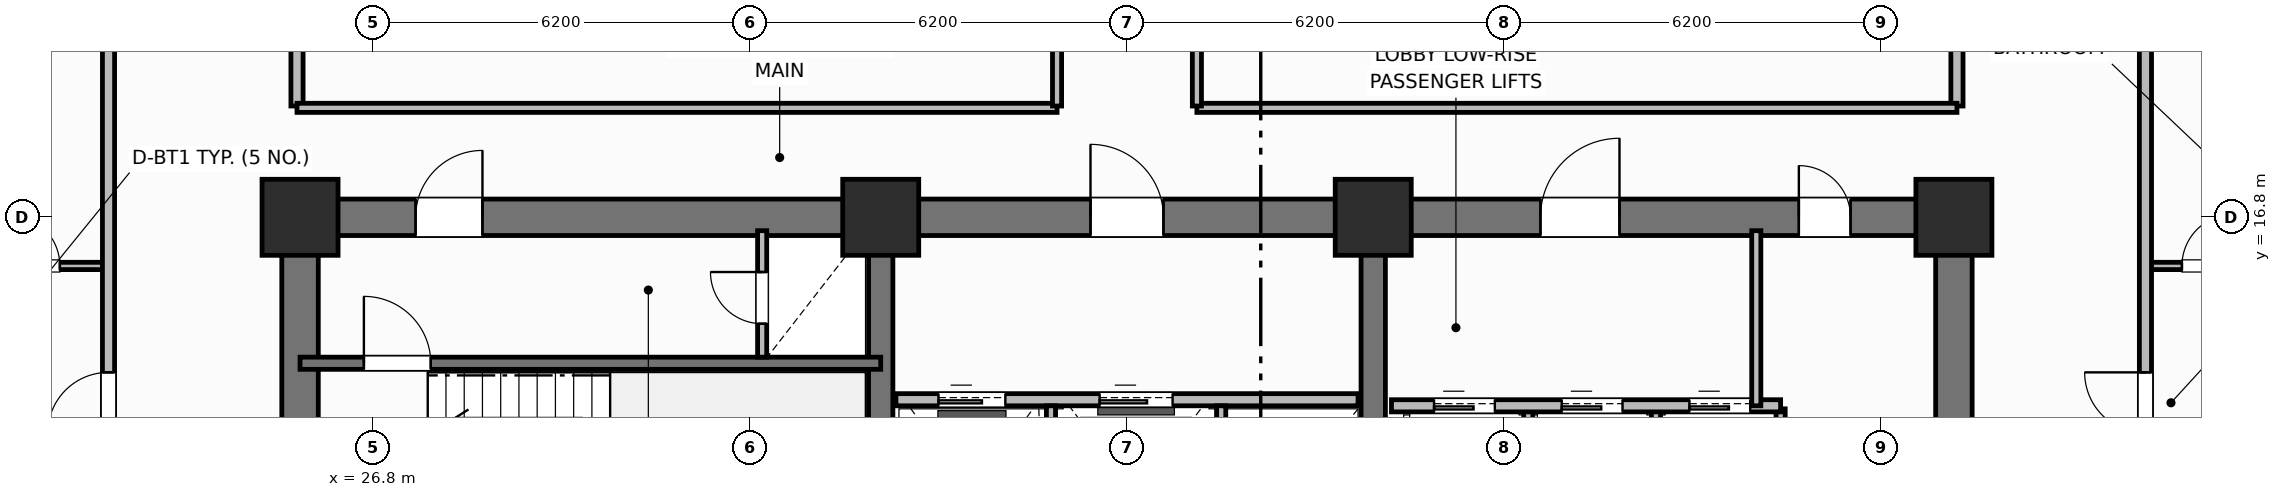
"""IFC4 building model, lengths in metres.
Left out: names, types, materials, properties, quantities, classifications, styles, units other than length and angle.
Written with IfcOpenShell. Run it as: python <this file> out.ifc"""

import sys

from ifc_helpers import new_model, si_unit, direction, frame, frame_2d, origin, origin_2d, place, context, subcontext, project, spatial, rectangle, extrude, element, fill, save


model = new_model("IFC4")
c1 = context("Model", 3, precision=1e-05, world=origin(), true_north=direction((0.0, 1.0)))
c2 = subcontext(c1, "Body", "Model", "MODEL_VIEW")
j1 = project(units=[si_unit("LENGTHUNIT", "METRE"), si_unit("PLANEANGLEUNIT", "RADIAN")], contexts=[c1])
p1 = place(None, origin())
s1 = spatial("IfcSite", under=j1, at=p1, CompositionType="ELEMENT")
p2 = place(p1, origin())
s2 = spatial("IfcBuilding", under=s1, at=p2, CompositionType="ELEMENT")
p3 = place(p2, frame((0.0, 0.0, 32.5)))
s3 = spatial("IfcBuildingStorey", under=s2, at=p3, CompositionType="ELEMENT", Elevation=32.5)
for number, where, z_axis, x_axis in (
    (1, (25.6, 10.9, 0.0), (0.0, 0.0, 1.0), (0.0, 1.0, 0.0)),
    (2, (52.8, 10.9, 0.0), (0.0, 0.0, 1.0), (0.0, 1.0, 0.0)),
):
    element("IfcWall", number, at=place(p3, frame(where, z_axis=z_axis, x_axis=x_axis)), inside=s3, PredefinedType="SHEAR", context=c2, shape_type="SweptSolid", body=[
        extrude(rectangle(XDim=5.6, YDim=0.6, at=frame_2d((2.8, 0.0))), origin(), (0.0, 0.0, 1.0), 3.7),
    ])
p4 = place(p3, frame((25.6, 16.8, 0.0), z_axis=(0.0, 0.0, 1.0), x_axis=(1.0, 0.0, 0.0)))
e3 = element("IfcWall", 3, at=p4, inside=s3, PredefinedType="SHEAR", context=c2, shape_type="SweptSolid", body=[
    extrude(rectangle(XDim=27.2, YDim=0.6, at=frame_2d((13.6, 0.0))), origin(), (0.0, 0.0, 1.0), 3.7),
])
p5 = place(p4, frame((1.9, 0.0, 0.0)))
e4 = element("IfcOpeningElement", 4, at=p5, cuts=e3, PredefinedType="OPENING", context=c2, shape_type="SweptSolid", body=[
    extrude(rectangle(XDim=1.1, YDim=2.15, at=frame_2d((0.55, 1.075))), frame((0.0, 0.31, 0.0), z_axis=(0.0, -1.0, 0.0), x_axis=(1.0, 0.0, 0.0)), (0.0, 0.0, 1.0), 0.62),
])
p6 = place(p4, frame((13.0, 0.0, 0.0)))
e5 = element("IfcOpeningElement", 5, at=p6, cuts=e3, PredefinedType="OPENING", context=c2, shape_type="SweptSolid", body=[
    extrude(rectangle(XDim=1.2, YDim=2.15, at=frame_2d((0.6, 1.075))), frame((0.0, 0.31, 0.0), z_axis=(0.0, -1.0, 0.0), x_axis=(1.0, 0.0, 0.0)), (0.0, 0.0, 1.0), 0.62),
])
p7 = place(p4, frame((20.4, 0.0, 0.0)))
e6 = element("IfcOpeningElement", 6, at=p7, cuts=e3, PredefinedType="OPENING", context=c2, shape_type="SweptSolid", body=[
    extrude(rectangle(XDim=1.3, YDim=2.2, at=frame_2d((0.65, 1.1))), frame((0.0, 0.31, 0.0), z_axis=(0.0, -1.0, 0.0), x_axis=(1.0, 0.0, 0.0)), (0.0, 0.0, 1.0), 0.62),
])
p8 = place(p4, frame((24.65, 0.0, 0.0)))
e7 = element("IfcOpeningElement", 7, at=p8, cuts=e3, PredefinedType="OPENING", context=c2, shape_type="SweptSolid", body=[
    extrude(rectangle(XDim=0.85, YDim=2.1, at=frame_2d((0.425, 1.05))), frame((0.0, 0.31, 0.0), z_axis=(0.0, -1.0, 0.0), x_axis=(1.0, 0.0, 0.0)), (0.0, 0.0, 1.0), 0.62),
])
for number, where, z_axis, x_axis in (
    (8, (35.15, 10.9, 0.0), (0.0, 0.0, 1.0), (0.0, 1.0, 0.0)),
    (9, (43.25, 10.9, 0.0), (0.0, 0.0, 1.0), (0.0, 1.0, 0.0)),
):
    element("IfcWall", number, at=place(p3, frame(where, z_axis=z_axis, x_axis=x_axis)), inside=s3, PredefinedType="SHEAR", context=c2, shape_type="SweptSolid", body=[
        extrude(rectangle(XDim=5.6, YDim=0.4, at=frame_2d((2.8, 0.0))), origin(), (0.0, 0.0, 1.0), 3.7),
    ])
for number, where, z_axis, x_axis in (
    (10, (25.6, 16.8, 0.0), (0.0, 0.0, 1.0), (1.0, 0.0, 0.0)),
    (11, (35.15, 16.8, 0.0), (0.0, 0.0, 1.0), (1.0, 0.0, 0.0)),
    (12, (43.25, 16.8, 0.0), (0.0, 0.0, 1.0), (1.0, 0.0, 0.0)),
    (13, (52.8, 16.8, 0.0), (0.0, 0.0, 1.0), (1.0, 0.0, 0.0)),
):
    element("IfcColumn", number, at=place(p3, frame(where, z_axis=z_axis, x_axis=x_axis)), inside=s3, PredefinedType="COLUMN", context=c2, shape_type="SweptSolid", body=[
        extrude(rectangle(XDim=1.25, YDim=1.25, at=origin_2d()), origin(), (0.0, 0.0, 1.0), 3.7),
    ])
p9 = place(p3, frame((25.6, 14.4, 0.0), z_axis=(0.0, 0.0, 1.0), x_axis=(1.0, 0.0, 0.0)))
e14 = element("IfcWall", 14, at=p9, inside=s3, PredefinedType="SHEAR", context=c2, shape_type="SweptSolid", body=[
    extrude(rectangle(XDim=9.55, YDim=0.2, at=frame_2d((4.775, 0.0))), origin(), (0.0, 0.0, 1.0), 3.7),
])
p10 = place(p9, frame((1.05, 0.0, 0.0)))
e15 = element("IfcOpeningElement", 15, at=p10, cuts=e14, PredefinedType="OPENING", context=c2, shape_type="SweptSolid", body=[
    extrude(rectangle(XDim=1.1, YDim=2.15, at=frame_2d((0.55, 1.075))), frame((0.0, 0.11, 0.0), z_axis=(0.0, -1.0, 0.0), x_axis=(1.0, 0.0, 0.0)), (0.0, 0.0, 1.0), 0.22),
])
p11 = place(p3, frame((33.2, 14.5, 0.0), z_axis=(0.0, 0.0, 1.0), x_axis=(0.0, 1.0, 0.0)))
e16 = element("IfcWall", 16, at=p11, inside=s3, PredefinedType="PARTITIONING", context=c2, shape_type="SweptSolid", body=[
    extrude(rectangle(XDim=2.08, YDim=0.15, at=frame_2d((1.04, 0.0))), origin(), (0.0, 0.0, 1.0), 2.53),
])
p12 = place(p11, frame((0.55, 0.0, 0.0)))
e17 = element("IfcOpeningElement", 17, at=p12, cuts=e16, PredefinedType="OPENING", context=c2, shape_type="SweptSolid", body=[
    extrude(rectangle(XDim=0.85, YDim=2.05, at=frame_2d((0.425, 1.025))), frame((0.0, 0.085, 0.0), z_axis=(0.0, -1.0, 0.0), x_axis=(1.0, 0.0, 0.0)), (0.0, 0.0, 1.0), 0.17),
])
p13 = place(p3, frame((35.4, 13.8, 0.0), z_axis=(0.0, 0.0, 1.0), x_axis=(1.0, 0.0, 0.0)))
e18 = element("IfcWall", 18, at=p13, inside=s3, PredefinedType="PARTITIONING", context=c2, shape_type="SweptSolid", body=[
    extrude(rectangle(XDim=7.6, YDim=0.2, at=frame_2d((3.8, 0.0))), origin(), (0.0, 0.0, 1.0), 2.3),
])
p14 = place(p13, frame((0.7, 0.0, 0.0)))
e19 = element("IfcOpeningElement", 19, at=p14, cuts=e18, PredefinedType="OPENING", context=c2, shape_type="SweptSolid", body=[
    extrude(rectangle(XDim=1.1, YDim=2.15, at=frame_2d((0.55, 1.075))), frame((0.0, 0.11, 0.0), z_axis=(0.0, -1.0, 0.0), x_axis=(1.0, 0.0, 0.0)), (0.0, 0.0, 1.0), 0.22),
])
p15 = place(p13, frame((3.35, 0.0, 0.0)))
e20 = element("IfcOpeningElement", 20, at=p15, cuts=e18, PredefinedType="OPENING", context=c2, shape_type="SweptSolid", body=[
    extrude(rectangle(XDim=1.2, YDim=2.15, at=frame_2d((0.6, 1.075))), frame((0.0, 0.11, 0.0), z_axis=(0.0, -1.0, 0.0), x_axis=(1.0, 0.0, 0.0)), (0.0, 0.0, 1.0), 0.22),
])
for number, where, z_axis, x_axis in (
    (21, (37.95, 10.95, 0.0), (0.0, 0.0, 1.0), (0.0, 1.0, 0.0)),
    (22, (40.75, 10.95, 0.0), (0.0, 0.0, 1.0), (0.0, 1.0, 0.0)),
):
    element("IfcWall", number, at=place(p3, frame(where, z_axis=z_axis, x_axis=x_axis)), inside=s3, PredefinedType="PARTITIONING", context=c2, shape_type="SweptSolid", body=[
        extrude(rectangle(XDim=2.75, YDim=0.15, at=frame_2d((1.375, 0.0))), origin(), (0.0, 0.0, 1.0), 2.53),
    ])
for number, where, z_axis, x_axis in (
    (23, (45.8, 10.95, 0.0), (0.0, 0.0, 1.0), (0.0, 1.0, 0.0)),
    (24, (47.9, 10.95, 0.0), (0.0, 0.0, 1.0), (0.0, 1.0, 0.0)),
    (25, (49.95, 10.95, 0.0), (0.0, 0.0, 1.0), (0.0, 1.0, 0.0)),
):
    element("IfcWall", number, at=place(p3, frame(where, z_axis=z_axis, x_axis=x_axis)), inside=s3, PredefinedType="PARTITIONING", context=c2, shape_type="SweptSolid", body=[
        extrude(rectangle(XDim=2.7, YDim=0.15, at=frame_2d((1.35, 0.0))), origin(), (0.0, 0.0, 1.0), 2.53),
    ])
p16 = place(p3, frame((43.55, 13.7, 0.0), z_axis=(0.0, 0.0, 1.0), x_axis=(1.0, 0.0, 0.0)))
e26 = element("IfcWall", 26, at=p16, inside=s3, PredefinedType="PARTITIONING", context=c2, shape_type="SweptSolid", body=[
    extrude(rectangle(XDim=6.4, YDim=0.2, at=frame_2d((3.2, 0.0))), origin(), (0.0, 0.0, 1.0), 2.53),
])
p17 = place(p16, frame((0.7, 0.0, 0.0)))
e27 = element("IfcOpeningElement", 27, at=p17, cuts=e26, PredefinedType="OPENING", context=c2, shape_type="SweptSolid", body=[
    extrude(rectangle(XDim=1.0, YDim=2.15, at=frame_2d((0.5, 1.075))), frame((0.0, 0.11, 0.0), z_axis=(0.0, -1.0, 0.0), x_axis=(1.0, 0.0, 0.0)), (0.0, 0.0, 1.0), 0.22),
])
p18 = place(p16, frame((2.8, 0.0, 0.0)))
e28 = element("IfcOpeningElement", 28, at=p18, cuts=e26, PredefinedType="OPENING", context=c2, shape_type="SweptSolid", body=[
    extrude(rectangle(XDim=1.0, YDim=2.15, at=frame_2d((0.5, 1.075))), frame((0.0, 0.11, 0.0), z_axis=(0.0, -1.0, 0.0), x_axis=(1.0, 0.0, 0.0)), (0.0, 0.0, 1.0), 0.22),
])
p19 = place(p16, frame((4.9, 0.0, 0.0)))
e29 = element("IfcOpeningElement", 29, at=p19, cuts=e26, PredefinedType="OPENING", context=c2, shape_type="SweptSolid", body=[
    extrude(rectangle(XDim=1.0, YDim=2.15, at=frame_2d((0.5, 1.075))), frame((0.0, 0.11, 0.0), z_axis=(0.0, -1.0, 0.0), x_axis=(1.0, 0.0, 0.0)), (0.0, 0.0, 1.0), 0.22),
])
p20 = place(p3, frame((49.55, 13.7, 0.0), z_axis=(0.0, 0.0, 1.0), x_axis=(0.0, 1.0, 0.0)))
e30 = element("IfcWall", 30, at=p20, inside=s3, PredefinedType="PARTITIONING", context=c2, shape_type="SweptSolid", body=[
    extrude(rectangle(XDim=2.88, YDim=0.15, at=frame_2d((1.44, 0.0))), origin(), (0.0, 0.0, 1.0), 2.53),
])
for number, where, z_axis, x_axis in (
    (31, (25.55, 18.63, 0.0), (0.0, 0.0, 1.0), (0.0, 1.0, 0.0)),
    (32, (52.85, 18.63, 0.0), (0.0, 0.0, 1.0), (0.0, 1.0, 0.0)),
):
    element("IfcWall", number, at=place(p3, frame(where, z_axis=z_axis, x_axis=x_axis)), inside=s3, PredefinedType="PARTITIONING", context=c2, shape_type="SweptSolid", body=[
        extrude(rectangle(XDim=19.14, YDim=0.2, at=frame_2d((9.57, 0.0))), origin(), (0.0, 0.0, 1.0), 2.53),
    ])
for number, where, z_axis, x_axis in (
    (33, (25.55, 18.6, 0.0), (0.0, 0.0, 1.0), (1.0, 0.0, 0.0)),
    (34, (40.35, 18.6, 0.0), (0.0, 0.0, 1.0), (1.0, 0.0, 0.0)),
):
    element("IfcWall", number, at=place(p3, frame(where, z_axis=z_axis, x_axis=x_axis)), inside=s3, PredefinedType="PARTITIONING", context=c2, shape_type="SweptSolid", body=[
        extrude(rectangle(XDim=12.5, YDim=0.15, at=frame_2d((6.25, 0.0))), origin(), (0.0, 0.0, 1.0), 2.53),
    ])
p21 = place(p3, frame((38.05, 18.63, 0.0), z_axis=(0.0, 0.0, 1.0), x_axis=(0.0, 1.0, 0.0)))
e35 = element("IfcWall", 35, at=p21, inside=s3, PredefinedType="PARTITIONING", context=c2, shape_type="SweptSolid", body=[
    extrude(rectangle(XDim=19.14, YDim=0.15, at=frame_2d((9.57, 0.0))), origin(), (0.0, 0.0, 1.0), 2.53),
])
p22 = place(p21, frame((5.5, 0.0, 0.0)))
e36 = element("IfcOpeningElement", 36, at=p22, cuts=e35, PredefinedType="OPENING", context=c2, shape_type="SweptSolid", body=[
    extrude(rectangle(XDim=1.0, YDim=2.15, at=frame_2d((0.5, 1.075))), frame((0.0, 0.085, 0.0), z_axis=(0.0, -1.0, 0.0), x_axis=(1.0, 0.0, 0.0)), (0.0, 0.0, 1.0), 0.17),
])
p23 = place(p3, frame((40.35, 18.63, 0.0), z_axis=(0.0, 0.0, 1.0), x_axis=(0.0, 1.0, 0.0)))
e37 = element("IfcWall", 37, at=p23, inside=s3, PredefinedType="PARTITIONING", context=c2, shape_type="SweptSolid", body=[
    extrude(rectangle(XDim=19.14, YDim=0.15, at=frame_2d((9.57, 0.0))), origin(), (0.0, 0.0, 1.0), 2.53),
])
p24 = place(p23, frame((5.5, 0.0, 0.0)))
e38 = element("IfcOpeningElement", 38, at=p24, cuts=e37, PredefinedType="OPENING", context=c2, shape_type="SweptSolid", body=[
    extrude(rectangle(XDim=1.0, YDim=2.15, at=frame_2d((0.5, 1.075))), frame((0.0, 0.085, 0.0), z_axis=(0.0, -1.0, 0.0), x_axis=(1.0, 0.0, 0.0)), (0.0, 0.0, 1.0), 0.17),
])
p25 = place(p3, frame((20.2, 16.0, 0.0), z_axis=(0.0, 0.0, 1.0), x_axis=(1.0, 0.0, 0.0)))
e39 = element("IfcWall", 39, at=p25, inside=s3, PredefinedType="PARTITIONING", context=c2, shape_type="SweptSolid", body=[
    extrude(rectangle(XDim=2.25, YDim=0.12, at=frame_2d((1.125, 0.0))), origin(), (0.0, 0.0, 1.0), 2.53),
])
p26 = place(p25, frame((0.6, 0.0, 0.0)))
e40 = element("IfcOpeningElement", 40, at=p26, cuts=e39, PredefinedType="OPENING", context=c2, shape_type="SweptSolid", body=[
    extrude(rectangle(XDim=0.85, YDim=2.1, at=frame_2d((0.425, 1.05))), frame((0.0, 0.07, 0.0), z_axis=(0.0, -1.0, 0.0), x_axis=(1.0, 0.0, 0.0)), (0.0, 0.0, 1.0), 0.14),
])
p27 = place(p3, frame((22.45, 10.6, 0.0), z_axis=(0.0, 0.0, 1.0), x_axis=(0.0, 1.0, 0.0)))
e41 = element("IfcWall", 41, at=p27, inside=s3, PredefinedType="PARTITIONING", context=c2, shape_type="SweptSolid", body=[
    extrude(rectangle(XDim=35.2, YDim=0.2, at=frame_2d((17.6, 0.0))), origin(), (0.0, 0.0, 1.0), 2.53),
])
p28 = place(p27, frame((2.65, 0.0, 0.0)))
e42 = element("IfcOpeningElement", 42, at=p28, cuts=e41, PredefinedType="OPENING", context=c2, shape_type="SweptSolid", body=[
    extrude(rectangle(XDim=1.0, YDim=2.15, at=frame_2d((0.5, 1.075))), frame((0.0, 0.11, 0.0), z_axis=(0.0, -1.0, 0.0), x_axis=(1.0, 0.0, 0.0)), (0.0, 0.0, 1.0), 0.22),
])
p29 = place(p27, frame((19.95, 0.0, 0.0)))
e43 = element("IfcOpeningElement", 43, at=p29, cuts=e41, PredefinedType="OPENING", context=c2, shape_type="SweptSolid", body=[
    extrude(rectangle(XDim=1.0, YDim=2.15, at=frame_2d((0.5, 1.075))), frame((0.0, 0.11, 0.0), z_axis=(0.0, -1.0, 0.0), x_axis=(1.0, 0.0, 0.0)), (0.0, 0.0, 1.0), 0.22),
])
p30 = place(p3, frame((55.95, 16.0, 0.0), z_axis=(0.0, 0.0, 1.0), x_axis=(1.0, 0.0, 0.0)))
e44 = element("IfcWall", 44, at=p30, inside=s3, PredefinedType="PARTITIONING", context=c2, shape_type="SweptSolid", body=[
    extrude(rectangle(XDim=2.25, YDim=0.12, at=frame_2d((1.125, 0.0))), origin(), (0.0, 0.0, 1.0), 2.53),
])
p31 = place(p30, frame((0.6, 0.0, 0.0)))
e45 = element("IfcOpeningElement", 45, at=p31, cuts=e44, PredefinedType="OPENING", context=c2, shape_type="SweptSolid", body=[
    extrude(rectangle(XDim=0.85, YDim=2.1, at=frame_2d((0.425, 1.05))), frame((0.0, 0.07, 0.0), z_axis=(0.0, -1.0, 0.0), x_axis=(1.0, 0.0, 0.0)), (0.0, 0.0, 1.0), 0.14),
])
p32 = place(p3, frame((55.95, 10.6, 0.0), z_axis=(0.0, 0.0, 1.0), x_axis=(0.0, 1.0, 0.0)))
e46 = element("IfcWall", 46, at=p32, inside=s3, PredefinedType="PARTITIONING", context=c2, shape_type="SweptSolid", body=[
    extrude(rectangle(XDim=35.2, YDim=0.2, at=frame_2d((17.6, 0.0))), origin(), (0.0, 0.0, 1.0), 2.53),
])
p33 = place(p32, frame((2.65, 0.0, 0.0)))
e47 = element("IfcOpeningElement", 47, at=p33, cuts=e46, PredefinedType="OPENING", context=c2, shape_type="SweptSolid", body=[
    extrude(rectangle(XDim=1.0, YDim=2.15, at=frame_2d((0.5, 1.075))), frame((0.0, 0.11, 0.0), z_axis=(0.0, -1.0, 0.0), x_axis=(1.0, 0.0, 0.0)), (0.0, 0.0, 1.0), 0.22),
])
p34 = place(p32, frame((12.518, 0.0, 0.0)))
e48 = element("IfcOpeningElement", 48, at=p34, cuts=e46, PredefinedType="OPENING", context=c2, shape_type="SweptSolid", body=[
    extrude(rectangle(XDim=1.0, YDim=2.15, at=frame_2d((0.5, 1.075))), frame((0.0, 0.11, 0.0), z_axis=(0.0, -1.0, 0.0), x_axis=(1.0, 0.0, 0.0)), (0.0, 0.0, 1.0), 0.22),
])
p35 = place(p32, frame((23.65, 0.0, 0.0)))
e49 = element("IfcOpeningElement", 49, at=p35, cuts=e46, PredefinedType="OPENING", context=c2, shape_type="SweptSolid", body=[
    extrude(rectangle(XDim=1.0, YDim=2.15, at=frame_2d((0.5, 1.075))), frame((0.0, 0.11, 0.0), z_axis=(0.0, -1.0, 0.0), x_axis=(1.0, 0.0, 0.0)), (0.0, 0.0, 1.0), 0.22),
])
p36 = place(p10, origin())
e50 = element("IfcDoor", 50, at=p36, inside=s3, OperationType="SINGLE_SWING_LEFT", PredefinedType="DOOR", context=c2, shape_type="SweptSolid", body=[
    extrude(rectangle(XDim=1.1, YDim=2.15, at=frame_2d((0.55, 1.075))), frame((0.0, 0.025, 0.0), z_axis=(0.0, -1.0, 0.0), x_axis=(1.0, 0.0, 0.0)), (0.0, 0.0, 1.0), 0.05),
])
fill(e15, e50)
p37 = place(p12, origin())
e51 = element("IfcDoor", 51, at=p37, inside=s3, OperationType="SINGLE_SWING_RIGHT", PredefinedType="TRAPDOOR", context=c2, shape_type="SweptSolid", body=[
    extrude(rectangle(XDim=0.85, YDim=2.05, at=frame_2d((0.425, 1.025))), frame((0.0, 0.025, 0.0), z_axis=(0.0, -1.0, 0.0), x_axis=(1.0, 0.0, 0.0)), (0.0, 0.0, 1.0), 0.05),
])
fill(e17, e51)
p38 = place(p14, origin())
e52 = element("IfcDoor", 52, at=p38, inside=s3, OperationType="SLIDING_TO_LEFT", PredefinedType="DOOR", context=c2, shape_type="SweptSolid", body=[
    extrude(rectangle(XDim=1.1, YDim=2.15, at=frame_2d((0.55, 1.075))), frame((0.0, 0.025, 0.0), z_axis=(0.0, -1.0, 0.0), x_axis=(1.0, 0.0, 0.0)), (0.0, 0.0, 1.0), 0.05),
])
fill(e19, e52)
p39 = place(p15, origin())
e53 = element("IfcDoor", 53, at=p39, inside=s3, OperationType="SLIDING_TO_LEFT", PredefinedType="DOOR", context=c2, shape_type="SweptSolid", body=[
    extrude(rectangle(XDim=1.2, YDim=2.15, at=frame_2d((0.6, 1.075))), frame((0.0, 0.025, 0.0), z_axis=(0.0, -1.0, 0.0), x_axis=(1.0, 0.0, 0.0)), (0.0, 0.0, 1.0), 0.05),
])
fill(e20, e53)
p40 = place(p17, origin())
e54 = element("IfcDoor", 54, at=p40, inside=s3, OperationType="SLIDING_TO_LEFT", PredefinedType="DOOR", context=c2, shape_type="SweptSolid", body=[
    extrude(rectangle(XDim=1.0, YDim=2.15, at=frame_2d((0.5, 1.075))), frame((0.0, 0.025, 0.0), z_axis=(0.0, -1.0, 0.0), x_axis=(1.0, 0.0, 0.0)), (0.0, 0.0, 1.0), 0.05),
])
fill(e27, e54)
p41 = place(p18, origin())
e55 = element("IfcDoor", 55, at=p41, inside=s3, OperationType="SLIDING_TO_LEFT", PredefinedType="DOOR", context=c2, shape_type="SweptSolid", body=[
    extrude(rectangle(XDim=1.0, YDim=2.15, at=frame_2d((0.5, 1.075))), frame((0.0, 0.025, 0.0), z_axis=(0.0, -1.0, 0.0), x_axis=(1.0, 0.0, 0.0)), (0.0, 0.0, 1.0), 0.05),
])
fill(e28, e55)
p42 = place(p19, origin())
e56 = element("IfcDoor", 56, at=p42, inside=s3, OperationType="SLIDING_TO_LEFT", PredefinedType="DOOR", context=c2, shape_type="SweptSolid", body=[
    extrude(rectangle(XDim=1.0, YDim=2.15, at=frame_2d((0.5, 1.075))), frame((0.0, 0.025, 0.0), z_axis=(0.0, -1.0, 0.0), x_axis=(1.0, 0.0, 0.0)), (0.0, 0.0, 1.0), 0.05),
])
fill(e29, e56)
p43 = place(p26, origin())
e57 = element("IfcDoor", 57, at=p43, inside=s3, OperationType="SINGLE_SWING_LEFT", PredefinedType="DOOR", context=c2, shape_type="SweptSolid", body=[
    extrude(rectangle(XDim=0.85, YDim=2.1, at=frame_2d((0.425, 1.05))), frame((0.0, 0.025, 0.0), z_axis=(0.0, -1.0, 0.0), x_axis=(1.0, 0.0, 0.0)), (0.0, 0.0, 1.0), 0.05),
])
fill(e40, e57)
p44 = place(p28, origin())
e58 = element("IfcDoor", 58, at=p44, inside=s3, OperationType="SINGLE_SWING_LEFT", PredefinedType="DOOR", context=c2, shape_type="SweptSolid", body=[
    extrude(rectangle(XDim=1.0, YDim=2.15, at=frame_2d((0.5, 1.075))), frame((0.0, 0.025, 0.0), z_axis=(0.0, -1.0, 0.0), x_axis=(1.0, 0.0, 0.0)), (0.0, 0.0, 1.0), 0.05),
])
fill(e42, e58)
p45 = place(p31, origin())
e59 = element("IfcDoor", 59, at=p45, inside=s3, OperationType="SINGLE_SWING_RIGHT", PredefinedType="DOOR", context=c2, shape_type="SweptSolid", body=[
    extrude(rectangle(XDim=0.85, YDim=2.1, at=frame_2d((0.425, 1.05))), frame((0.0, 0.025, 0.0), z_axis=(0.0, -1.0, 0.0), x_axis=(1.0, 0.0, 0.0)), (0.0, 0.0, 1.0), 0.05),
])
fill(e45, e59)
p46 = place(p33, origin())
e60 = element("IfcDoor", 60, at=p46, inside=s3, OperationType="SINGLE_SWING_RIGHT", PredefinedType="DOOR", context=c2, shape_type="SweptSolid", body=[
    extrude(rectangle(XDim=1.0, YDim=2.15, at=frame_2d((0.5, 1.075))), frame((0.0, 0.025, 0.0), z_axis=(0.0, -1.0, 0.0), x_axis=(1.0, 0.0, 0.0)), (0.0, 0.0, 1.0), 0.05),
])
fill(e47, e60)
p47 = place(p5, origin())
e61 = element("IfcDoor", 61, at=p47, inside=s3, OperationType="SINGLE_SWING_RIGHT", PredefinedType="DOOR", context=c2, shape_type="SweptSolid", body=[
    extrude(rectangle(XDim=1.1, YDim=2.15, at=frame_2d((0.55, 1.075))), frame((0.0, 0.025, 0.0), z_axis=(0.0, -1.0, 0.0), x_axis=(1.0, 0.0, 0.0)), (0.0, 0.0, 1.0), 0.05),
])
fill(e4, e61)
p48 = place(p6, origin())
e62 = element("IfcDoor", 62, at=p48, inside=s3, OperationType="SINGLE_SWING_LEFT", PredefinedType="DOOR", context=c2, shape_type="SweptSolid", body=[
    extrude(rectangle(XDim=1.2, YDim=2.15, at=frame_2d((0.6, 1.075))), frame((0.0, 0.025, 0.0), z_axis=(0.0, -1.0, 0.0), x_axis=(1.0, 0.0, 0.0)), (0.0, 0.0, 1.0), 0.05),
])
fill(e5, e62)
p49 = place(p7, origin())
e63 = element("IfcDoor", 63, at=p49, inside=s3, OperationType="SINGLE_SWING_RIGHT", PredefinedType="DOOR", context=c2, shape_type="SweptSolid", body=[
    extrude(rectangle(XDim=1.3, YDim=2.2, at=frame_2d((0.65, 1.1))), frame((0.0, 0.025, 0.0), z_axis=(0.0, -1.0, 0.0), x_axis=(1.0, 0.0, 0.0)), (0.0, 0.0, 1.0), 0.05),
])
fill(e6, e63)
p50 = place(p8, origin())
e64 = element("IfcDoor", 64, at=p50, inside=s3, OperationType="SINGLE_SWING_LEFT", PredefinedType="DOOR", context=c2, shape_type="SweptSolid", body=[
    extrude(rectangle(XDim=0.85, YDim=2.1, at=frame_2d((0.425, 1.05))), frame((0.0, 0.025, 0.0), z_axis=(0.0, -1.0, 0.0), x_axis=(1.0, 0.0, 0.0)), (0.0, 0.0, 1.0), 0.05),
])
fill(e7, e64)
save(model, sys.argv[1])
